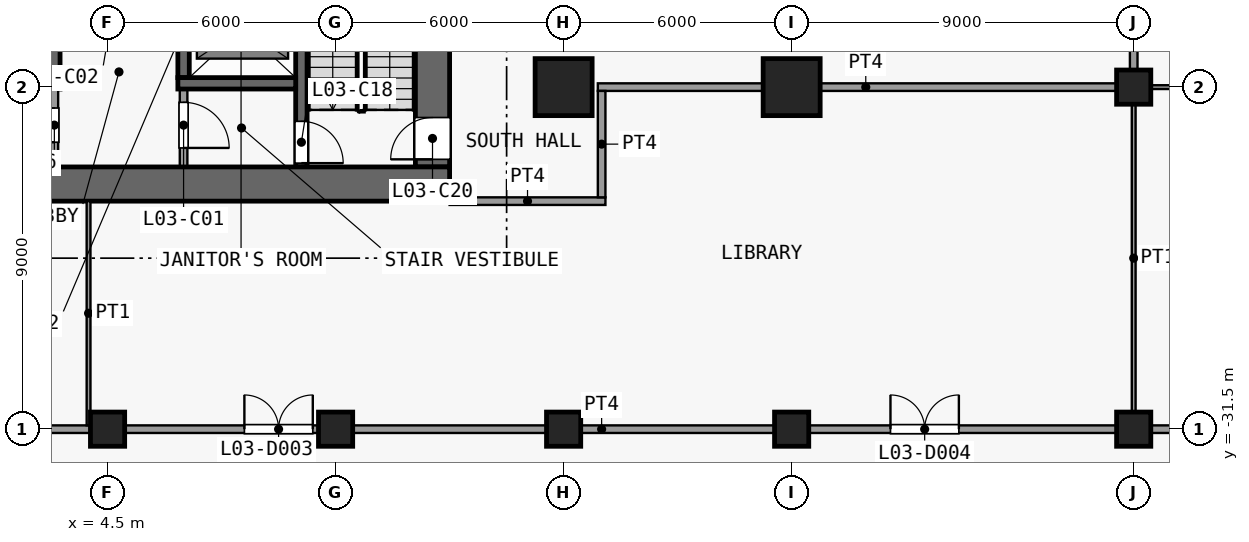
"""IFC4 building model, lengths in metres.
Left out: names, types, materials, properties, quantities, classifications, styles, units other than length and angle.
Written with IfcOpenShell. Run it as: python <this file> out.ifc"""

import sys

from ifc_helpers import new_model, si_unit, direction, frame, frame_2d, origin, origin_2d, place, context, subcontext, project, spatial, rectangle, extrude, element, fill, save


model = new_model("IFC4")
c1 = context("Model", 3, precision=1e-05, world=origin(), true_north=direction((0.0, 1.0)))
c2 = subcontext(c1, "Body", "Model", "MODEL_VIEW")
j1 = project(units=[si_unit("LENGTHUNIT", "METRE"), si_unit("PLANEANGLEUNIT", "RADIAN")], contexts=[c1])
p1 = place(None, origin())
s1 = spatial("IfcSite", under=j1, at=p1, CompositionType="ELEMENT")
p2 = place(p1, origin())
s2 = spatial("IfcBuilding", under=s1, at=p2, CompositionType="ELEMENT")
p3 = place(p2, frame((0.0, 0.0, 18.5)))
s3 = spatial("IfcBuildingStorey", under=s2, at=p3, CompositionType="ELEMENT", Elevation=18.5)
for number, where, z_axis, x_axis in (
    (1, (4.5, -31.5, 0.0), (0.0, 0.0, 1.0), (1.0, 0.0, 0.0)),
    (2, (10.5, -31.5, 0.0), (0.0, 0.0, 1.0), (1.0, 0.0, 0.0)),
    (3, (16.5, -31.5, 0.0), (0.0, 0.0, 1.0), (1.0, 0.0, 0.0)),
):
    element("IfcColumn", number, at=place(p3, frame(where, z_axis=z_axis, x_axis=x_axis)), inside=s3, PredefinedType="COLUMN", context=c2, shape_type="SweptSolid", body=[
        extrude(rectangle(XDim=0.9, YDim=0.9, at=origin_2d()), origin(), (0.0, 0.0, 1.0), 5.0),
    ])
p4 = place(p3, frame((16.5, -22.5, 0.0), z_axis=(0.0, 0.0, 1.0), x_axis=(1.0, 0.0, 0.0)))
e4 = element("IfcColumn", 4, at=p4, inside=s3, PredefinedType="COLUMN", context=c2, shape_type="SweptSolid", body=[
    extrude(rectangle(XDim=1.5, YDim=1.5, at=origin_2d()), origin(), (0.0, 0.0, 1.0), 5.0),
])
p5 = place(p3, frame((22.5, -31.5, 0.0), z_axis=(0.0, 0.0, 1.0), x_axis=(1.0, 0.0, 0.0)))
e5 = element("IfcColumn", 5, at=p5, inside=s3, PredefinedType="COLUMN", context=c2, shape_type="SweptSolid", body=[
    extrude(rectangle(XDim=0.9, YDim=0.9, at=origin_2d()), origin(), (0.0, 0.0, 1.0), 5.0),
])
p6 = place(p3, frame((22.5, -22.5, 0.0), z_axis=(0.0, 0.0, 1.0), x_axis=(1.0, 0.0, 0.0)))
e6 = element("IfcColumn", 6, at=p6, inside=s3, PredefinedType="COLUMN", context=c2, shape_type="SweptSolid", body=[
    extrude(rectangle(XDim=1.5, YDim=1.5, at=origin_2d()), origin(), (0.0, 0.0, 1.0), 5.0),
])
for number, where, z_axis, x_axis in (
    (7, (31.5, -31.5, 0.0), (0.0, 0.0, 1.0), (1.0, 0.0, 0.0)),
    (8, (31.5, -22.5, 0.0), (0.0, 0.0, 1.0), (1.0, 0.0, 0.0)),
):
    element("IfcColumn", number, at=place(p3, frame(where, z_axis=z_axis, x_axis=x_axis)), inside=s3, PredefinedType="COLUMN", context=c2, shape_type="SweptSolid", body=[
        extrude(rectangle(XDim=0.9, YDim=0.9, at=origin_2d()), origin(), (0.0, 0.0, 1.0), 5.0),
    ])
p7 = place(p3, frame((-13.5, -25.05, 0.0), z_axis=(0.0, 0.0, 1.0), x_axis=(1.0, 0.0, 0.0)))
e9 = element("IfcWall", 9, at=p7, inside=s3, PredefinedType="SHEAR", context=c2, shape_type="SweptSolid", body=[
    extrude(rectangle(XDim=27.0, YDim=0.9, at=frame_2d((13.5, 0.0))), origin(), (0.0, 0.0, 1.0), 4.65),
])
p8 = place(p3, frame((13.05, -24.6, 0.0), z_axis=(0.0, 0.0, 1.0), x_axis=(0.0, 1.0, 0.0)))
e10 = element("IfcWall", 10, at=p8, inside=s3, PredefinedType="SHEAR", context=c2, shape_type="SweptSolid", body=[
    extrude(rectangle(XDim=16.1, YDim=0.9, at=frame_2d((8.05, 0.0))), origin(), (0.0, 0.0, 1.0), 4.65),
])
p9 = place(p8, frame((0.2, 0.0, 0.0)))
e11 = element("IfcOpeningElement", 11, at=p9, cuts=e10, PredefinedType="OPENING", context=c2, shape_type="SweptSolid", body=[
    extrude(rectangle(XDim=1.1, YDim=2.1, at=frame_2d((0.55, 1.05))), frame((0.0, 0.46, 0.0), z_axis=(0.0, -1.0, 0.0), x_axis=(1.0, 0.0, 0.0)), (0.0, 0.0, 1.0), 0.92),
])
p10 = place(p3, frame((-2.95, -22.4, 0.0), z_axis=(0.0, 0.0, 1.0), x_axis=(1.0, 0.0, 0.0)))
e12 = element("IfcWall", 12, at=p10, inside=s3, PredefinedType="SHEAR", context=c2, shape_type="SweptSolid", body=[
    extrude(rectangle(XDim=6.2, YDim=0.3, at=frame_2d((3.1, 0.0))), origin(), (0.0, 0.0, 1.0), 4.65),
])
p11 = place(p3, frame((6.35, -22.4, 0.0), z_axis=(0.0, 0.0, 1.0), x_axis=(1.0, 0.0, 0.0)))
e13 = element("IfcWall", 13, at=p11, inside=s3, PredefinedType="SHEAR", context=c2, shape_type="SweptSolid", body=[
    extrude(rectangle(XDim=3.1, YDim=0.3, at=frame_2d((1.55, 0.0))), origin(), (0.0, 0.0, 1.0), 4.65),
])
p12 = place(p3, frame((3.1, -24.6, 0.0), z_axis=(0.0, 0.0, 1.0), x_axis=(0.0, 1.0, 0.0)))
e14 = element("IfcWall", 14, at=p12, inside=s3, PredefinedType="PARTITIONING", context=c2, shape_type="SweptSolid", body=[
    extrude(rectangle(XDim=2.05, YDim=0.2, at=frame_2d((1.025, 0.0))), origin(), (0.0, 0.0, 1.0), 4.65),
])
p13 = place(p12, frame((0.65, 0.0, 0.0)))
e15 = element("IfcOpeningElement", 15, at=p13, cuts=e14, PredefinedType="OPENING", context=c2, shape_type="SweptSolid", body=[
    extrude(rectangle(XDim=0.9, YDim=2.1, at=frame_2d((0.45, 1.05))), frame((0.0, 0.11, 0.0), z_axis=(0.0, -1.0, 0.0), x_axis=(1.0, 0.0, 0.0)), (0.0, 0.0, 1.0), 0.22),
])
p14 = place(p3, frame((3.1, -22.25, 0.0), z_axis=(0.0, 0.0, 1.0), x_axis=(0.0, 1.0, 0.0)))
e16 = element("IfcWall", 16, at=p14, inside=s3, PredefinedType="SHEAR", context=c2, shape_type="SweptSolid", body=[
    extrude(rectangle(XDim=2.85, YDim=0.3, at=frame_2d((1.425, 0.0))), origin(), (0.0, 0.0, 1.0), 4.65),
])
p15 = place(p14, frame((0.75, 0.0, 0.0)))
e17 = element("IfcOpeningElement", 17, at=p15, cuts=e16, PredefinedType="OPENING", context=c2, shape_type="SweptSolid", body=[
    extrude(rectangle(XDim=1.1, YDim=2.1, at=frame_2d((0.55, 1.05))), frame((0.0, 0.16, 0.0), z_axis=(0.0, -1.0, 0.0), x_axis=(1.0, 0.0, 0.0)), (0.0, 0.0, 1.0), 0.32),
])
p16 = place(p3, frame((6.5, -22.55, 0.0), z_axis=(0.0, 0.0, 1.0), x_axis=(0.0, -1.0, 0.0)))
e18 = element("IfcWall", 18, at=p16, inside=s3, PredefinedType="PARTITIONING", context=c2, shape_type="SweptSolid", body=[
    extrude(rectangle(XDim=2.05, YDim=0.2, at=frame_2d((1.025, 0.0))), origin(), (0.0, 0.0, 1.0), 4.65),
])
p17 = place(p16, frame((0.35, 0.0, 0.0)))
e19 = element("IfcOpeningElement", 19, at=p17, cuts=e18, PredefinedType="OPENING", context=c2, shape_type="SweptSolid", body=[
    extrude(rectangle(XDim=1.2, YDim=2.1, at=frame_2d((0.6, 1.05))), frame((0.0, 0.11, 0.0), z_axis=(0.0, -1.0, 0.0), x_axis=(1.0, 0.0, 0.0)), (0.0, 0.0, 1.0), 0.22),
])
p18 = place(p3, frame((6.5, -22.25, 0.0), z_axis=(0.0, 0.0, 1.0), x_axis=(0.0, 1.0, 0.0)))
e20 = element("IfcWall", 20, at=p18, inside=s3, PredefinedType="SHEAR", context=c2, shape_type="SweptSolid", body=[
    extrude(rectangle(XDim=2.6, YDim=0.3, at=frame_2d((1.3, 0.0))), origin(), (0.0, 0.0, 1.0), 4.65),
])
p19 = place(p18, frame((0.75, 0.0, 0.0)))
e21 = element("IfcOpeningElement", 21, at=p19, cuts=e20, PredefinedType="OPENING", context=c2, shape_type="SweptSolid", body=[
    extrude(rectangle(XDim=1.1, YDim=2.1, at=frame_2d((0.55, 1.05))), frame((0.0, 0.16, 0.0), z_axis=(0.0, -1.0, 0.0), x_axis=(1.0, 0.0, 0.0)), (0.0, 0.0, 1.0), 0.32),
])
p20 = place(p3, frame((9.6, -16.9, 0.0), z_axis=(0.0, 0.0, 1.0), x_axis=(0.0, -1.0, 0.0)))
e22 = element("IfcWall", 22, at=p20, inside=s3, PredefinedType="SHEAR", context=c2, shape_type="SweptSolid", body=[
    extrude(rectangle(XDim=7.7, YDim=0.3, at=frame_2d((3.85, 0.0))), origin(), (0.0, 0.0, 1.0), 4.65),
])
p21 = place(p20, frame((6.5, 0.0, 0.0)))
e23 = element("IfcOpeningElement", 23, at=p21, cuts=e22, PredefinedType="OPENING", context=c2, shape_type="SweptSolid", body=[
    extrude(rectangle(XDim=1.1, YDim=2.1, at=frame_2d((0.55, 1.05))), frame((0.0, 0.16, 0.0), z_axis=(0.0, -1.0, 0.0), x_axis=(1.0, 0.0, 0.0)), (0.0, 0.0, 1.0), 0.32),
])
p22 = place(p3, frame((-25.9, -31.5, 0.0), z_axis=(0.0, 0.0, 1.0), x_axis=(1.0, 0.0, 0.0)))
e24 = element("IfcWall", 24, at=p22, inside=s3, PredefinedType="PARTITIONING", context=c2, shape_type="SweptSolid", body=[
    extrude(rectangle(XDim=78.15, YDim=0.2, at=frame_2d((39.075, 0.0))), origin(), (0.0, 0.0, 1.0), 4.65),
])
p23 = place(p22, frame((12.6, 0.0, 0.0)))
e25 = element("IfcOpeningElement", 25, at=p23, cuts=e24, PredefinedType="OPENING", context=c2, shape_type="SweptSolid", body=[
    extrude(rectangle(XDim=1.0, YDim=2.1, at=frame_2d((0.5, 1.05))), frame((0.0, 0.11, 0.0), z_axis=(0.0, -1.0, 0.0), x_axis=(1.0, 0.0, 0.0)), (0.0, 0.0, 1.0), 0.22),
])
p24 = place(p22, frame((25.2, 0.0, 0.0)))
e26 = element("IfcOpeningElement", 26, at=p24, cuts=e24, PredefinedType="OPENING", context=c2, shape_type="SweptSolid", body=[
    extrude(rectangle(XDim=1.0, YDim=2.1, at=frame_2d((0.5, 1.05))), frame((0.0, 0.11, 0.0), z_axis=(0.0, -1.0, 0.0), x_axis=(1.0, 0.0, 0.0)), (0.0, 0.0, 1.0), 0.22),
])
p25 = place(p22, frame((34.0, 0.0, 0.0)))
e27 = element("IfcOpeningElement", 27, at=p25, cuts=e24, PredefinedType="OPENING", context=c2, shape_type="SweptSolid", body=[
    extrude(rectangle(XDim=1.8, YDim=2.1, at=frame_2d((0.9, 1.05))), frame((0.0, 0.11, 0.0), z_axis=(0.0, -1.0, 0.0), x_axis=(1.0, 0.0, 0.0)), (0.0, 0.0, 1.0), 0.22),
])
p26 = place(p22, frame((51.0, 0.0, 0.0)))
e28 = element("IfcOpeningElement", 28, at=p26, cuts=e24, PredefinedType="OPENING", context=c2, shape_type="SweptSolid", body=[
    extrude(rectangle(XDim=1.8, YDim=2.1, at=frame_2d((0.9, 1.05))), frame((0.0, 0.11, 0.0), z_axis=(0.0, -1.0, 0.0), x_axis=(1.0, 0.0, 0.0)), (0.0, 0.0, 1.0), 0.22),
])
p27 = place(p22, frame((60.6, 0.0, 0.0)))
e29 = element("IfcOpeningElement", 29, at=p27, cuts=e24, PredefinedType="OPENING", context=c2, shape_type="SweptSolid", body=[
    extrude(rectangle(XDim=1.8, YDim=2.1, at=frame_2d((0.9, 1.05))), frame((0.0, 0.11, 0.0), z_axis=(0.0, -1.0, 0.0), x_axis=(1.0, 0.0, 0.0)), (0.0, 0.0, 1.0), 0.22),
])
p28 = place(p22, frame((73.0, 0.0, 0.0)))
e30 = element("IfcOpeningElement", 30, at=p28, cuts=e24, PredefinedType="OPENING", context=c2, shape_type="SweptSolid", body=[
    extrude(rectangle(XDim=1.8, YDim=2.1, at=frame_2d((0.9, 1.05))), frame((0.0, 0.11, 0.0), z_axis=(0.0, -1.0, 0.0), x_axis=(1.0, 0.0, 0.0)), (0.0, 0.0, 1.0), 0.22),
])
p29 = place(p3, frame((13.5, -25.5, 0.0), z_axis=(0.0, 0.0, 1.0), x_axis=(1.0, 0.0, 0.0)))
e31 = element("IfcWall", 31, at=p29, inside=s3, PredefinedType="PARTITIONING", context=c2, shape_type="SweptSolid", body=[
    extrude(rectangle(XDim=4.1, YDim=0.2, at=frame_2d((2.05, 0.0))), origin(), (0.0, 0.0, 1.0), 4.65),
])
p30 = place(p3, frame((17.4, -22.5, 0.0), z_axis=(0.0, 0.0, 1.0), x_axis=(1.0, 0.0, 0.0)))
e32 = element("IfcWall", 32, at=p30, inside=s3, PredefinedType="PARTITIONING", context=c2, shape_type="SweptSolid", body=[
    extrude(rectangle(XDim=14.1, YDim=0.2, at=frame_2d((7.05, 0.0))), origin(), (0.0, 0.0, 1.0), 4.65),
])
p31 = place(p3, frame((31.5, -22.5, 0.0), z_axis=(0.0, 0.0, 1.0), x_axis=(1.0, 0.0, 0.0)))
e33 = element("IfcWall", 33, at=p31, inside=s3, PredefinedType="PARTITIONING", context=c2, shape_type="SweptSolid", body=[
    extrude(rectangle(XDim=20.95, YDim=0.1, at=frame_2d((10.475, 0.0))), origin(), (0.0, 0.0, 1.0), 4.65),
])
p32 = place(p3, frame((4.0, -31.4, 0.0), z_axis=(0.0, 0.0, 1.0), x_axis=(0.0, 1.0, 0.0)))
e34 = element("IfcWall", 34, at=p32, inside=s3, PredefinedType="PARTITIONING", context=c2, shape_type="SweptSolid", body=[
    extrude(rectangle(XDim=5.9, YDim=0.1, at=frame_2d((2.95, 0.0))), origin(), (0.0, 0.0, 1.0), 4.65),
])
p33 = place(p3, frame((17.5, -25.4, 0.0), z_axis=(0.0, 0.0, 1.0), x_axis=(0.0, 1.0, 0.0)))
e35 = element("IfcWall", 35, at=p33, inside=s3, PredefinedType="PARTITIONING", context=c2, shape_type="SweptSolid", body=[
    extrude(rectangle(XDim=2.8, YDim=0.2, at=frame_2d((1.4, 0.0))), origin(), (0.0, 0.0, 1.0), 4.65),
])
p34 = place(p3, frame((31.5, -22.4, 0.0), z_axis=(0.0, 0.0, 1.0), x_axis=(0.0, 1.0, 0.0)))
e36 = element("IfcWall", 36, at=p34, inside=s3, PredefinedType="PARTITIONING", context=c2, shape_type="SweptSolid", body=[
    extrude(rectangle(XDim=5.8, YDim=0.2, at=frame_2d((2.9, 0.0))), origin(), (0.0, 0.0, 1.0), 4.65),
])
p35 = place(p34, frame((0.9, 0.0, 0.0)))
e37 = element("IfcOpeningElement", 37, at=p35, cuts=e36, PredefinedType="OPENING", context=c2, shape_type="SweptSolid", body=[
    extrude(rectangle(XDim=1.0, YDim=2.1, at=frame_2d((0.5, 1.05))), frame((0.0, 0.11, 0.0), z_axis=(0.0, -1.0, 0.0), x_axis=(1.0, 0.0, 0.0)), (0.0, 0.0, 1.0), 0.22),
])
p36 = place(p3, frame((31.5, -31.4, 0.0), z_axis=(0.0, 0.0, 1.0), x_axis=(0.0, 1.0, 0.0)))
e38 = element("IfcWall", 38, at=p36, inside=s3, PredefinedType="PARTITIONING", context=c2, shape_type="SweptSolid", body=[
    extrude(rectangle(XDim=8.8, YDim=0.1, at=frame_2d((4.4, 0.0))), origin(), (0.0, 0.0, 1.0), 4.65),
])
p37 = place(p17, origin())
e39 = element("IfcDoor", 39, at=p37, inside=s3, OperationType="SINGLE_SWING_RIGHT", PredefinedType="DOOR", context=c2, shape_type="SweptSolid", body=[
    extrude(rectangle(XDim=1.2, YDim=2.1, at=frame_2d((0.6, 1.05))), frame((0.0, 0.025, 0.0), z_axis=(0.0, -1.0, 0.0), x_axis=(1.0, 0.0, 0.0)), (0.0, 0.0, 1.0), 0.05),
])
fill(e19, e39)
p38 = place(p13, origin())
e40 = element("IfcDoor", 40, at=p38, inside=s3, OperationType="SINGLE_SWING_LEFT", PredefinedType="DOOR", context=c2, shape_type="SweptSolid", body=[
    extrude(rectangle(XDim=0.9, YDim=2.1, at=frame_2d((0.45, 1.05))), frame((0.0, 0.025, 0.0), z_axis=(0.0, -1.0, 0.0), x_axis=(1.0, 0.0, 0.0)), (0.0, 0.0, 1.0), 0.05),
])
fill(e15, e40)
p39 = place(p21, origin())
e41 = element("IfcDoor", 41, at=p39, inside=s3, OperationType="SINGLE_SWING_RIGHT", PredefinedType="DOOR", context=c2, shape_type="SweptSolid", body=[
    extrude(rectangle(XDim=1.1, YDim=2.1, at=frame_2d((0.55, 1.05))), frame((0.0, 0.025, 0.0), z_axis=(0.0, -1.0, 0.0), x_axis=(1.0, 0.0, 0.0)), (0.0, 0.0, 1.0), 0.05),
])
fill(e23, e41)
p40 = place(p9, origin())
e42 = element("IfcDoor", 42, at=p40, inside=s3, OperationType="SINGLE_SWING_LEFT", PredefinedType="DOOR", context=c2, shape_type="SweptSolid", body=[
    extrude(rectangle(XDim=1.1, YDim=2.1, at=frame_2d((0.55, 1.05))), frame((0.0, 0.025, 0.0), z_axis=(0.0, -1.0, 0.0), x_axis=(1.0, 0.0, 0.0)), (0.0, 0.0, 1.0), 0.05),
])
fill(e11, e42)
p41 = place(p25, origin())
e43 = element("IfcDoor", 43, at=p41, inside=s3, OperationType="DOUBLE_DOOR_SINGLE_SWING", PredefinedType="DOOR", context=c2, shape_type="SweptSolid", body=[
    extrude(rectangle(XDim=1.8, YDim=2.1, at=frame_2d((0.9, 1.05))), frame((0.0, 0.025, 0.0), z_axis=(0.0, -1.0, 0.0), x_axis=(1.0, 0.0, 0.0)), (0.0, 0.0, 1.0), 0.05),
])
fill(e27, e43)
p42 = place(p26, origin())
e44 = element("IfcDoor", 44, at=p42, inside=s3, OperationType="DOUBLE_DOOR_SINGLE_SWING", PredefinedType="DOOR", context=c2, shape_type="SweptSolid", body=[
    extrude(rectangle(XDim=1.8, YDim=2.1, at=frame_2d((0.9, 1.05))), frame((0.0, 0.025, 0.0), z_axis=(0.0, -1.0, 0.0), x_axis=(1.0, 0.0, 0.0)), (0.0, 0.0, 1.0), 0.05),
])
fill(e28, e44)
save(model, sys.argv[1])
